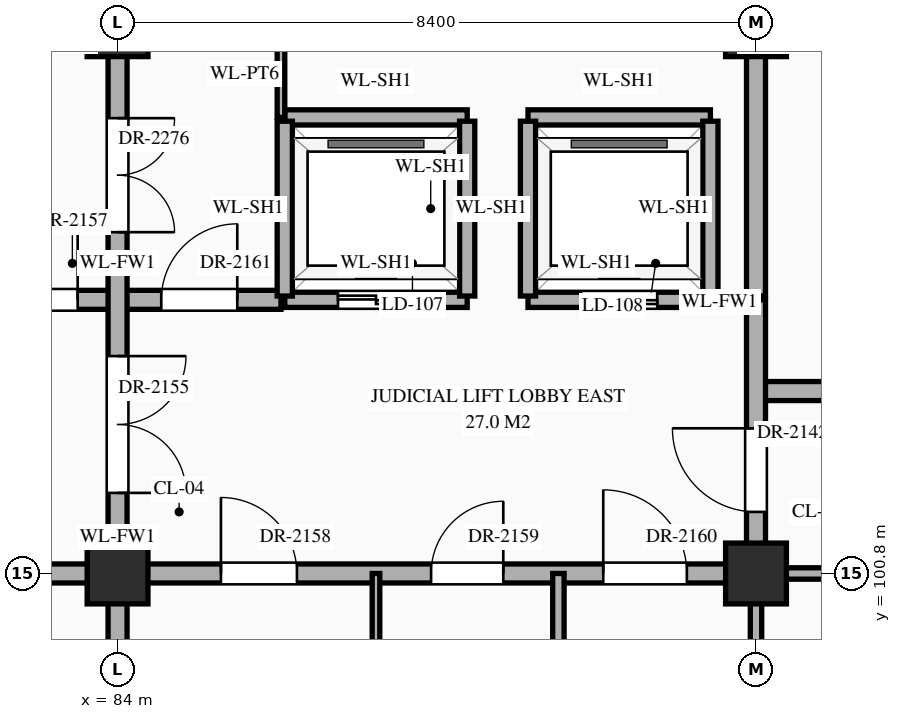
"""IFC4 building model, lengths in metres.
Left out: names, types, materials, properties, quantities, classifications, styles, units other than length and angle.
Written with IfcOpenShell. Run it as: python <this file> out.ifc"""

import sys

from ifc_helpers import new_model, si_unit, direction, frame, frame_2d, origin, origin_2d, place, context, subcontext, project, spatial, rectangle, extrude, element, fill, save


model = new_model("IFC4")
c1 = context("Model", 3, precision=1e-05, world=origin(), true_north=direction((0.0, 1.0)))
c2 = subcontext(c1, "Body", "Model", "MODEL_VIEW")
j1 = project(units=[si_unit("LENGTHUNIT", "METRE"), si_unit("PLANEANGLEUNIT", "RADIAN")], contexts=[c1])
p1 = place(None, origin())
s1 = spatial("IfcSite", under=j1, at=p1, CompositionType="ELEMENT")
p2 = place(p1, origin())
s2 = spatial("IfcBuilding", under=s1, at=p2, CompositionType="ELEMENT")
p3 = place(p2, frame((0.0, 0.0, 26.1)))
s3 = spatial("IfcBuildingStorey", under=s2, at=p3, CompositionType="ELEMENT", Elevation=26.1)
for number, where, z_axis, x_axis in (
    (1, (84.0, 100.8, 0.0), (0.0, 0.0, 1.0), (1.0, 0.0, 0.0)),
    (2, (84.0, 108.0, 0.0), (0.0, 0.0, 1.0), (1.0, 0.0, 0.0)),
    (3, (92.4, 100.8, 0.0), (0.0, 0.0, 1.0), (1.0, 0.0, 0.0)),
    (4, (92.4, 108.0, 0.0), (0.0, 0.0, 1.0), (1.0, 0.0, 0.0)),
):
    element("IfcColumn", number, at=place(p3, frame(where, z_axis=z_axis, x_axis=x_axis)), inside=s3, PredefinedType="COLUMN", context=c2, shape_type="SweptSolid", body=[
        extrude(rectangle(XDim=0.8, YDim=0.8, at=origin_2d()), origin(), (0.0, 0.0, 1.0), 4.5),
    ])
p4 = place(p3, frame((75.6, 100.8, 0.0), z_axis=(0.0, 0.0, 1.0), x_axis=(1.0, 0.0, 0.0)))
e5 = element("IfcWall", 5, at=p4, inside=s3, PredefinedType="STANDARD", context=c2, shape_type="SweptSolid", body=[
    extrude(rectangle(XDim=16.8, YDim=0.25, at=frame_2d((8.4, 0.0))), origin(), (0.0, 0.0, 1.0), 3.39),
])
p5 = place(p4, frame((3.725, 0.0, 0.0)))
e6 = element("IfcOpeningElement", 6, at=p5, cuts=e5, PredefinedType="OPENING", context=c2, shape_type="SweptSolid", body=[
    extrude(rectangle(XDim=0.95, YDim=2.15, at=frame_2d((0.475, 1.075))), frame((0.0, 0.137, 0.0), z_axis=(0.0, -1.0, 0.0), x_axis=(1.0, 0.0, 0.0)), (0.0, 0.0, 1.0), 0.274),
])
p6 = place(p4, frame((9.76, 0.0, 0.0)))
e7 = element("IfcOpeningElement", 7, at=p6, cuts=e5, PredefinedType="OPENING", context=c2, shape_type="SweptSolid", body=[
    extrude(rectangle(XDim=1.0, YDim=2.2, at=frame_2d((0.5, 1.1))), frame((0.0, 0.137, 0.0), z_axis=(0.0, -1.0, 0.0), x_axis=(1.0, 0.0, 0.0)), (0.0, 0.0, 1.0), 0.274),
])
p7 = place(p4, frame((12.525, 0.0, 0.0)))
e8 = element("IfcOpeningElement", 8, at=p7, cuts=e5, PredefinedType="OPENING", context=c2, shape_type="SweptSolid", body=[
    extrude(rectangle(XDim=0.95, YDim=2.15, at=frame_2d((0.475, 1.075))), frame((0.0, 0.137, 0.0), z_axis=(0.0, -1.0, 0.0), x_axis=(1.0, 0.0, 0.0)), (0.0, 0.0, 1.0), 0.274),
])
p8 = place(p4, frame((14.79, 0.0, 0.0)))
e9 = element("IfcOpeningElement", 9, at=p8, cuts=e5, PredefinedType="OPENING", context=c2, shape_type="SweptSolid", body=[
    extrude(rectangle(XDim=1.1, YDim=2.2, at=frame_2d((0.55, 1.1))), frame((0.0, 0.137, 0.0), z_axis=(0.0, -1.0, 0.0), x_axis=(1.0, 0.0, 0.0)), (0.0, 0.0, 1.0), 0.274),
])
p9 = place(p3, frame((92.4, 100.8, 0.0), z_axis=(0.0, 0.0, 1.0), x_axis=(1.0, 0.0, 0.0)))
e10 = element("IfcWall", 10, at=p9, inside=s3, PredefinedType="STANDARD", context=c2, shape_type="SweptSolid", body=[
    extrude(rectangle(XDim=4.2, YDim=0.15, at=frame_2d((2.1, 0.0))), origin(), (0.0, 0.0, 1.0), 3.39),
])
p10 = place(p9, frame((1.7, 0.0, 0.0)))
e11 = element("IfcOpeningElement", 11, at=p10, cuts=e10, PredefinedType="OPENING", context=c2, shape_type="SweptSolid", body=[
    extrude(rectangle(XDim=1.12, YDim=2.25, at=frame_2d((0.56, 1.125))), frame((0.0, 0.087, 0.0), z_axis=(0.0, -1.0, 0.0), x_axis=(1.0, 0.0, 0.0)), (0.0, 0.0, 1.0), 0.174),
])
p11 = place(p3, frame((92.4, 103.2, 0.0), z_axis=(0.0, 0.0, 1.0), x_axis=(1.0, 0.0, 0.0)))
e12 = element("IfcWall", 12, at=p11, inside=s3, PredefinedType="STANDARD", context=c2, shape_type="SweptSolid", body=[
    extrude(rectangle(XDim=4.2, YDim=0.25, at=frame_2d((2.1, 0.0))), origin(), (0.0, 0.0, 1.0), 4.24),
])
p12 = place(p11, frame((1.6, 0.0, 0.0)))
e13 = element("IfcOpeningElement", 13, at=p12, cuts=e12, PredefinedType="OPENING", context=c2, shape_type="SweptSolid", body=[
    extrude(rectangle(XDim=1.0, YDim=2.2, at=frame_2d((0.5, 1.1))), frame((0.0, 0.137, 0.0), z_axis=(0.0, -1.0, 0.0), x_axis=(1.0, 0.0, 0.0)), (0.0, 0.0, 1.0), 0.274),
])
p13 = place(p3, frame((81.85, 104.4, 0.0), z_axis=(0.0, 0.0, 1.0), x_axis=(1.0, 0.0, 0.0)))
e14 = element("IfcWall", 14, at=p13, inside=s3, PredefinedType="STANDARD", context=c2, shape_type="SweptSolid", body=[
    extrude(rectangle(XDim=4.3, YDim=0.25, at=frame_2d((2.15, 0.0))), origin(), (0.0, 0.0, 1.0), 4.24),
])
p14 = place(p13, frame((0.525, 0.0, 0.0)))
e15 = element("IfcOpeningElement", 15, at=p14, cuts=e14, PredefinedType="OPENING", context=c2, shape_type="SweptSolid", body=[
    extrude(rectangle(XDim=1.1, YDim=2.2, at=frame_2d((0.55, 1.1))), frame((0.0, 0.137, 0.0), z_axis=(0.0, -1.0, 0.0), x_axis=(1.0, 0.0, 0.0)), (0.0, 0.0, 1.0), 0.274),
])
p15 = place(p13, frame((2.725, 0.0, 0.0)))
e16 = element("IfcOpeningElement", 16, at=p15, cuts=e14, PredefinedType="OPENING", context=c2, shape_type="SweptSolid", body=[
    extrude(rectangle(XDim=1.0, YDim=2.2, at=frame_2d((0.5, 1.1))), frame((0.0, 0.137, 0.0), z_axis=(0.0, -1.0, 0.0), x_axis=(1.0, 0.0, 0.0)), (0.0, 0.0, 1.0), 0.274),
])
p16 = place(p3, frame((86.2, 104.4, 0.0), z_axis=(0.0, 0.0, 1.0), x_axis=(1.0, 0.0, 0.0)))
e17 = element("IfcWall", 17, at=p16, inside=s3, PredefinedType="STANDARD", context=c2, shape_type="SweptSolid", body=[
    extrude(rectangle(XDim=2.4, YDim=0.2, at=frame_2d((1.2, 0.0))), origin(), (0.0, 0.0, 1.0), 4.24),
])
p17 = place(p16, frame((0.7, 0.0, 0.0)))
e18 = element("IfcOpeningElement", 18, at=p17, cuts=e17, PredefinedType="OPENING", context=c2, shape_type="SweptSolid", body=[
    extrude(rectangle(XDim=1.0, YDim=2.15, at=frame_2d((0.5, 1.075))), frame((0.0, 0.112, 0.0), z_axis=(0.0, -1.0, 0.0), x_axis=(1.0, 0.0, 0.0)), (0.0, 0.0, 1.0), 0.224),
])
p18 = place(p3, frame((89.4, 104.4, 0.0), z_axis=(0.0, 0.0, 1.0), x_axis=(1.0, 0.0, 0.0)))
e19 = element("IfcWall", 19, at=p18, inside=s3, PredefinedType="STANDARD", context=c2, shape_type="SweptSolid", body=[
    extrude(rectangle(XDim=2.4, YDim=0.2, at=frame_2d((1.2, 0.0))), origin(), (0.0, 0.0, 1.0), 4.24),
])
p19 = place(p18, frame((0.7, 0.0, 0.0)))
e20 = element("IfcOpeningElement", 20, at=p19, cuts=e19, PredefinedType="OPENING", context=c2, shape_type="SweptSolid", body=[
    extrude(rectangle(XDim=1.0, YDim=2.15, at=frame_2d((0.5, 1.075))), frame((0.0, 0.112, 0.0), z_axis=(0.0, -1.0, 0.0), x_axis=(1.0, 0.0, 0.0)), (0.0, 0.0, 1.0), 0.224),
])
for number, where, z_axis, x_axis in (
    (21, (86.2, 106.8, 0.0), (0.0, 0.0, 1.0), (1.0, 0.0, 0.0)),
    (22, (89.4, 106.8, 0.0), (0.0, 0.0, 1.0), (1.0, 0.0, 0.0)),
):
    element("IfcWall", number, at=place(p3, frame(where, z_axis=z_axis, x_axis=x_axis)), inside=s3, PredefinedType="STANDARD", context=c2, shape_type="SweptSolid", body=[
        extrude(rectangle(XDim=2.4, YDim=0.2, at=frame_2d((1.2, 0.0))), origin(), (0.0, 0.0, 1.0), 4.24),
    ])
p20 = place(p3, frame((84.0, 79.24, 0.0), z_axis=(0.0, 0.0, 1.0), x_axis=(0.0, 1.0, 0.0)))
e23 = element("IfcWall", 23, at=p20, inside=s3, PredefinedType="STANDARD", context=c2, shape_type="SweptSolid", body=[
    extrude(rectangle(XDim=35.92, YDim=0.25, at=frame_2d((17.96, 0.0))), origin(), (0.0, 0.0, 1.0), 3.49),
])
p21 = place(p20, frame((22.62, 0.0, 0.0)))
e24 = element("IfcOpeningElement", 24, at=p21, cuts=e23, PredefinedType="OPENING", context=c2, shape_type="SweptSolid", body=[
    extrude(rectangle(XDim=1.8, YDim=2.35, at=frame_2d((0.9, 1.175))), frame((0.0, 0.137, 0.0), z_axis=(0.0, -1.0, 0.0), x_axis=(1.0, 0.0, 0.0)), (0.0, 0.0, 1.0), 0.274),
])
p22 = place(p20, frame((12.5, 0.0, 0.0)))
e25 = element("IfcOpeningElement", 25, at=p22, cuts=e23, PredefinedType="OPENING", context=c2, shape_type="SweptSolid", body=[
    extrude(rectangle(XDim=1.0, YDim=2.2, at=frame_2d((0.5, 1.1))), frame((0.0, 0.137, 0.0), z_axis=(0.0, -1.0, 0.0), x_axis=(1.0, 0.0, 0.0)), (0.0, 0.0, 1.0), 0.274),
])
p23 = place(p20, frame((15.17, 0.0, 0.0)))
e26 = element("IfcOpeningElement", 26, at=p23, cuts=e23, PredefinedType="OPENING", context=c2, shape_type="SweptSolid", body=[
    extrude(rectangle(XDim=1.1, YDim=2.2, at=frame_2d((0.55, 1.1))), frame((0.0, 0.137, 0.0), z_axis=(0.0, -1.0, 0.0), x_axis=(1.0, 0.0, 0.0)), (0.0, 0.0, 1.0), 0.274),
])
p24 = place(p20, frame((26.05, 0.0, 0.0)))
e27 = element("IfcOpeningElement", 27, at=p24, cuts=e23, PredefinedType="OPENING", context=c2, shape_type="SweptSolid", body=[
    extrude(rectangle(XDim=1.5, YDim=2.25, at=frame_2d((0.75, 1.125))), frame((0.0, 0.137, 0.0), z_axis=(0.0, -1.0, 0.0), x_axis=(1.0, 0.0, 0.0)), (0.0, 0.0, 1.0), 0.274),
])
p25 = place(p20, frame((29.645, 0.0, 0.0)))
e28 = element("IfcOpeningElement", 28, at=p25, cuts=e23, PredefinedType="OPENING", context=c2, shape_type="SweptSolid", body=[
    extrude(rectangle(XDim=0.95, YDim=2.15, at=frame_2d((0.475, 1.075))), frame((0.0, 0.137, 0.0), z_axis=(0.0, -1.0, 0.0), x_axis=(1.0, 0.0, 0.0)), (0.0, 0.0, 1.0), 0.274),
])
p26 = place(p20, frame((5.325, 0.0, 0.0)))
e29 = element("IfcOpeningElement", 29, at=p26, cuts=e23, PredefinedType="OPENING", context=c2, shape_type="SweptSolid", body=[
    extrude(rectangle(XDim=0.95, YDim=2.15, at=frame_2d((0.475, 1.075))), frame((0.0, 0.137, 0.0), z_axis=(0.0, -1.0, 0.0), x_axis=(1.0, 0.0, 0.0)), (0.0, 0.0, 1.0), 0.274),
])
p27 = place(p3, frame((86.15, 106.8, 0.0), z_axis=(0.0, 0.0, 1.0), x_axis=(0.0, 1.0, 0.0)))
e30 = element("IfcWall", 30, at=p27, inside=s3, PredefinedType="STANDARD", context=c2, shape_type="SweptSolid", body=[
    extrude(rectangle(XDim=1.15, YDim=0.1, at=frame_2d((0.575, 0.0))), origin(), (0.0, 0.0, 1.0), 4.24),
])
p28 = place(p3, frame((86.2, 104.45, 0.0), z_axis=(0.0, 0.0, 1.0), x_axis=(0.0, 1.0, 0.0)))
e31 = element("IfcWall", 31, at=p28, inside=s3, PredefinedType="STANDARD", context=c2, shape_type="SweptSolid", body=[
    extrude(rectangle(XDim=2.3, YDim=0.2, at=frame_2d((1.15, 0.0))), origin(), (0.0, 0.0, 1.0), 4.24),
])
p29 = place(p3, frame((87.4, 96.0, 0.0), z_axis=(0.0, 0.0, 1.0), x_axis=(0.0, 1.0, 0.0)))
e32 = element("IfcWall", 32, at=p29, inside=s3, PredefinedType="STANDARD", context=c2, shape_type="SweptSolid", body=[
    extrude(rectangle(XDim=4.8, YDim=0.1, at=frame_2d((2.4, 0.0))), origin(), (0.0, 0.0, 1.0), 4.24),
])
p30 = place(p29, frame((1.88, 0.0, 0.0)))
e33 = element("IfcOpeningElement", 33, at=p30, cuts=e32, PredefinedType="OPENING", context=c2, shape_type="SweptSolid", body=[
    extrude(rectangle(XDim=1.04, YDim=2.2, at=frame_2d((0.52, 1.1))), frame((0.0, 0.062, 0.0), z_axis=(0.0, -1.0, 0.0), x_axis=(1.0, 0.0, 0.0)), (0.0, 0.0, 1.0), 0.124),
])
for number, where, z_axis, x_axis in (
    (34, (88.6, 104.45, 0.0), (0.0, 0.0, 1.0), (0.0, 1.0, 0.0)),
    (35, (89.4, 104.45, 0.0), (0.0, 0.0, 1.0), (0.0, 1.0, 0.0)),
):
    element("IfcWall", number, at=place(p3, frame(where, z_axis=z_axis, x_axis=x_axis)), inside=s3, PredefinedType="STANDARD", context=c2, shape_type="SweptSolid", body=[
        extrude(rectangle(XDim=2.3, YDim=0.2, at=frame_2d((1.15, 0.0))), origin(), (0.0, 0.0, 1.0), 4.24),
    ])
p31 = place(p3, frame((89.8, 96.0, 0.0), z_axis=(0.0, 0.0, 1.0), x_axis=(0.0, 1.0, 0.0)))
e36 = element("IfcWall", 36, at=p31, inside=s3, PredefinedType="STANDARD", context=c2, shape_type="SweptSolid", body=[
    extrude(rectangle(XDim=4.8, YDim=0.15, at=frame_2d((2.4, 0.0))), origin(), (0.0, 0.0, 1.0), 4.24),
])
p32 = place(p31, frame((1.86, 0.0, 0.0)))
e37 = element("IfcOpeningElement", 37, at=p32, cuts=e36, PredefinedType="OPENING", context=c2, shape_type="SweptSolid", body=[
    extrude(rectangle(XDim=1.08, YDim=2.25, at=frame_2d((0.54, 1.125))), frame((0.0, 0.087, 0.0), z_axis=(0.0, -1.0, 0.0), x_axis=(1.0, 0.0, 0.0)), (0.0, 0.0, 1.0), 0.174),
])
p33 = place(p3, frame((91.8, 104.45, 0.0), z_axis=(0.0, 0.0, 1.0), x_axis=(0.0, 1.0, 0.0)))
e38 = element("IfcWall", 38, at=p33, inside=s3, PredefinedType="STANDARD", context=c2, shape_type="SweptSolid", body=[
    extrude(rectangle(XDim=2.3, YDim=0.2, at=frame_2d((1.15, 0.0))), origin(), (0.0, 0.0, 1.0), 4.24),
])
p34 = place(p3, frame((92.4, 96.0, 0.0), z_axis=(0.0, 0.0, 1.0), x_axis=(0.0, 1.0, 0.0)))
e39 = element("IfcWall", 39, at=p34, inside=s3, PredefinedType="STANDARD", context=c2, shape_type="SweptSolid", body=[
    extrude(rectangle(XDim=4.8, YDim=0.15, at=frame_2d((2.4, 0.0))), origin(), (0.0, 0.0, 1.0), 3.49),
])
p35 = place(p3, frame((92.4, 100.8, 0.0), z_axis=(0.0, 0.0, 1.0), x_axis=(0.0, 1.0, 0.0)))
e40 = element("IfcWall", 40, at=p35, inside=s3, PredefinedType="STANDARD", context=c2, shape_type="SweptSolid", body=[
    extrude(rectangle(XDim=3.6, YDim=0.25, at=frame_2d((1.8, 0.0))), origin(), (0.0, 0.0, 1.0), 3.49),
])
p36 = place(p35, frame((0.81, 0.0, 0.0)))
e41 = element("IfcOpeningElement", 41, at=p36, cuts=e40, PredefinedType="OPENING", context=c2, shape_type="SweptSolid", body=[
    extrude(rectangle(XDim=1.1, YDim=2.2, at=frame_2d((0.55, 1.1))), frame((0.0, 0.137, 0.0), z_axis=(0.0, -1.0, 0.0), x_axis=(1.0, 0.0, 0.0)), (0.0, 0.0, 1.0), 0.274),
])
p37 = place(p3, frame((92.4, 104.45, 0.0), z_axis=(0.0, 0.0, 1.0), x_axis=(0.0, 1.0, 0.0)))
e42 = element("IfcWall", 42, at=p37, inside=s3, PredefinedType="STANDARD", context=c2, shape_type="SweptSolid", body=[
    extrude(rectangle(XDim=3.5, YDim=0.25, at=frame_2d((1.75, 0.0))), origin(), (0.0, 0.0, 1.0), 3.49),
])
p38 = place(p17, origin())
e43 = element("IfcDoor", 43, at=p38, inside=s3, OperationType="DOUBLE_DOOR_SLIDING", PredefinedType="DOOR", context=c2, shape_type="SweptSolid", body=[
    extrude(rectangle(XDim=1.0, YDim=2.15, at=frame_2d((0.5, 1.075))), frame((0.0, 0.025, 0.0), z_axis=(0.0, -1.0, 0.0), x_axis=(1.0, 0.0, 0.0)), (0.0, 0.0, 1.0), 0.05),
])
fill(e18, e43)
p39 = place(p19, origin())
e44 = element("IfcDoor", 44, at=p39, inside=s3, OperationType="DOUBLE_DOOR_SLIDING", PredefinedType="DOOR", context=c2, shape_type="SweptSolid", body=[
    extrude(rectangle(XDim=1.0, YDim=2.15, at=frame_2d((0.5, 1.075))), frame((0.0, 0.025, 0.0), z_axis=(0.0, -1.0, 0.0), x_axis=(1.0, 0.0, 0.0)), (0.0, 0.0, 1.0), 0.05),
])
fill(e20, e44)
p40 = place(p36, origin())
e45 = element("IfcDoor", 45, at=p40, inside=s3, OperationType="SINGLE_SWING_RIGHT", PredefinedType="DOOR", context=c2, shape_type="SweptSolid", body=[
    extrude(rectangle(XDim=1.1, YDim=2.2, at=frame_2d((0.55, 1.1))), frame((0.0, 0.025, 0.0), z_axis=(0.0, -1.0, 0.0), x_axis=(1.0, 0.0, 0.0)), (0.0, 0.0, 1.0), 0.05),
])
fill(e41, e45)
p41 = place(p21, frame((1.8, 0.0, 0.0), z_axis=(0.0, 0.0, 1.0), x_axis=(-1.0, 0.0, 0.0)))
e46 = element("IfcDoor", 46, at=p41, inside=s3, OperationType="DOUBLE_DOOR_SINGLE_SWING", PredefinedType="DOOR", context=c2, shape_type="SweptSolid", body=[
    extrude(rectangle(XDim=1.8, YDim=2.35, at=frame_2d((0.9, 1.175))), frame((0.0, 0.025, 0.0), z_axis=(0.0, -1.0, 0.0), x_axis=(1.0, 0.0, 0.0)), (0.0, 0.0, 1.0), 0.05),
])
fill(e24, e46)
p42 = place(p14, origin())
e47 = element("IfcDoor", 47, at=p42, inside=s3, OperationType="SINGLE_SWING_RIGHT", PredefinedType="DOOR", context=c2, shape_type="SweptSolid", body=[
    extrude(rectangle(XDim=1.1, YDim=2.2, at=frame_2d((0.55, 1.1))), frame((0.0, 0.025, 0.0), z_axis=(0.0, -1.0, 0.0), x_axis=(1.0, 0.0, 0.0)), (0.0, 0.0, 1.0), 0.05),
])
fill(e15, e47)
p43 = place(p6, origin())
e48 = element("IfcDoor", 48, at=p43, inside=s3, OperationType="SINGLE_SWING_LEFT", PredefinedType="DOOR", context=c2, shape_type="SweptSolid", body=[
    extrude(rectangle(XDim=1.0, YDim=2.2, at=frame_2d((0.5, 1.1))), frame((0.0, 0.025, 0.0), z_axis=(0.0, -1.0, 0.0), x_axis=(1.0, 0.0, 0.0)), (0.0, 0.0, 1.0), 0.05),
])
fill(e7, e48)
p44 = place(p7, origin())
e49 = element("IfcDoor", 49, at=p44, inside=s3, OperationType="SINGLE_SWING_RIGHT", PredefinedType="DOOR", context=c2, shape_type="SweptSolid", body=[
    extrude(rectangle(XDim=0.95, YDim=2.15, at=frame_2d((0.475, 1.075))), frame((0.0, 0.025, 0.0), z_axis=(0.0, -1.0, 0.0), x_axis=(1.0, 0.0, 0.0)), (0.0, 0.0, 1.0), 0.05),
])
fill(e8, e49)
p45 = place(p8, origin())
e50 = element("IfcDoor", 50, at=p45, inside=s3, OperationType="SINGLE_SWING_LEFT", PredefinedType="DOOR", context=c2, shape_type="SweptSolid", body=[
    extrude(rectangle(XDim=1.1, YDim=2.2, at=frame_2d((0.55, 1.1))), frame((0.0, 0.025, 0.0), z_axis=(0.0, -1.0, 0.0), x_axis=(1.0, 0.0, 0.0)), (0.0, 0.0, 1.0), 0.05),
])
fill(e9, e50)
p46 = place(p15, origin())
e51 = element("IfcDoor", 51, at=p46, inside=s3, OperationType="SINGLE_SWING_RIGHT", PredefinedType="DOOR", context=c2, shape_type="SweptSolid", body=[
    extrude(rectangle(XDim=1.0, YDim=2.2, at=frame_2d((0.5, 1.1))), frame((0.0, 0.025, 0.0), z_axis=(0.0, -1.0, 0.0), x_axis=(1.0, 0.0, 0.0)), (0.0, 0.0, 1.0), 0.05),
])
fill(e16, e51)
p47 = place(p24, frame((1.5, 0.0, 0.0), z_axis=(0.0, 0.0, 1.0), x_axis=(-1.0, 0.0, 0.0)))
e52 = element("IfcDoor", 52, at=p47, inside=s3, OperationType="DOUBLE_DOOR_SINGLE_SWING", PredefinedType="DOOR", context=c2, shape_type="SweptSolid", body=[
    extrude(rectangle(XDim=1.5, YDim=2.25, at=frame_2d((0.75, 1.125))), frame((0.0, 0.025, 0.0), z_axis=(0.0, -1.0, 0.0), x_axis=(1.0, 0.0, 0.0)), (0.0, 0.0, 1.0), 0.05),
])
fill(e27, e52)
save(model, sys.argv[1])
